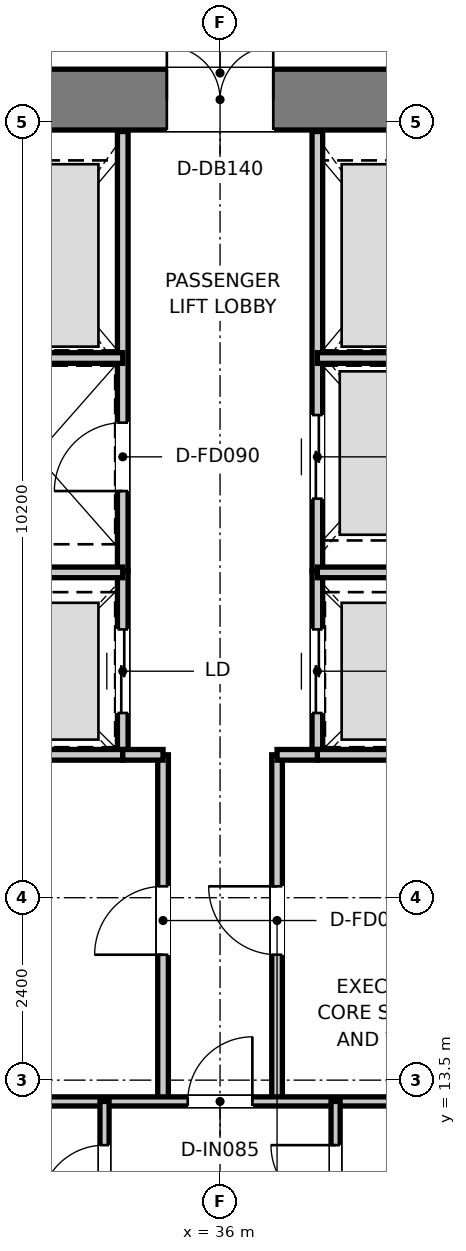
"""IFC4 building model, lengths in metres.
Left out: names, types, materials, properties, quantities, classifications, styles, units other than length and angle.
Written with IfcOpenShell. Run it as: python <this file> out.ifc"""

import sys

from ifc_helpers import new_model, si_unit, direction, frame, frame_2d, origin, place, context, subcontext, project, spatial, rectangle, extrude, element, fill, save


model = new_model("IFC4")
c1 = context("Model", 3, precision=1e-05, world=origin(), true_north=direction((0.0, 1.0)))
c2 = subcontext(c1, "Body", "Model", "MODEL_VIEW")
j1 = project(units=[si_unit("LENGTHUNIT", "METRE"), si_unit("PLANEANGLEUNIT", "RADIAN")], contexts=[c1])
p1 = place(None, origin())
s1 = spatial("IfcSite", under=j1, at=p1, CompositionType="ELEMENT")
p2 = place(p1, origin())
s2 = spatial("IfcBuilding", under=s1, at=p2, CompositionType="ELEMENT")
p3 = place(p2, frame((0.0, 0.0, 302.95)))
s3 = spatial("IfcBuildingStorey", under=s2, at=p3, CompositionType="ELEMENT", Elevation=302.95)
p4 = place(p3, frame((28.08, 26.4, 0.0), z_axis=(0.0, 0.0, 1.0), x_axis=(1.0, 0.0, 0.0)))
e1 = element("IfcWall", 1, at=p4, inside=s3, PredefinedType="SHEAR", context=c2, shape_type="SweptSolid", body=[
    extrude(rectangle(XDim=15.84, YDim=0.8, at=frame_2d((7.92, 0.0))), origin(), (0.0, 0.0, 1.0), 3.95),
])
p5 = place(p4, frame((7.22, 0.0, 0.0)))
e2 = element("IfcOpeningElement", 2, at=p5, cuts=e1, PredefinedType="OPENING", context=c2, shape_type="SweptSolid", body=[
    extrude(rectangle(XDim=1.4, YDim=2.2, at=frame_2d((0.7, 1.1))), frame((0.0, 0.41, 0.0), z_axis=(0.0, -1.0, 0.0), x_axis=(1.0, 0.0, 0.0)), (0.0, 0.0, 1.0), 0.82),
])
p6 = place(p4, frame((1.775, 0.0, 0.0)))
e3 = element("IfcOpeningElement", 3, at=p6, cuts=e1, PredefinedType="OPENING", context=c2, shape_type="SweptSolid", body=[
    extrude(rectangle(XDim=1.05, YDim=2.1, at=frame_2d((0.525, 1.05))), frame((0.0, 0.41, 0.0), z_axis=(0.0, -1.0, 0.0), x_axis=(1.0, 0.0, 0.0)), (0.0, 0.0, 1.0), 0.82),
])
p7 = place(p4, frame((13.015, 0.0, 0.0)))
e4 = element("IfcOpeningElement", 4, at=p7, cuts=e1, PredefinedType="OPENING", context=c2, shape_type="SweptSolid", body=[
    extrude(rectangle(XDim=1.05, YDim=2.1, at=frame_2d((0.525, 1.05))), frame((0.0, 0.41, 0.0), z_axis=(0.0, -1.0, 0.0), x_axis=(1.0, 0.0, 0.0)), (0.0, 0.0, 1.0), 0.82),
])
p8 = place(p3, frame((34.72, 20.2, 0.0), z_axis=(0.0, 0.0, 1.0), x_axis=(0.0, 1.0, 0.0)))
e5 = element("IfcWall", 5, at=p8, inside=s3, PredefinedType="PARTITIONING", context=c2, shape_type="SweptSolid", body=[
    extrude(rectangle(XDim=5.78, YDim=0.14, at=frame_2d((2.89, 0.0))), origin(), (0.0, 0.0, 1.0), 2.82),
])
p9 = place(p8, frame((1.05, 0.0, 0.0)))
e6 = element("IfcOpeningElement", 6, at=p9, cuts=e5, PredefinedType="OPENING", context=c2, shape_type="SweptSolid", body=[
    extrude(rectangle(XDim=0.9, YDim=2.1, at=frame_2d((0.45, 1.05))), frame((0.0, 0.08, 0.0), z_axis=(0.0, -1.0, 0.0), x_axis=(1.0, 0.0, 0.0)), (0.0, 0.0, 1.0), 0.16),
])
p10 = place(p3, frame((37.28, 20.2, 0.0), z_axis=(0.0, 0.0, 1.0), x_axis=(0.0, 1.0, 0.0)))
e7 = element("IfcWall", 7, at=p10, inside=s3, PredefinedType="PARTITIONING", context=c2, shape_type="SweptSolid", body=[
    extrude(rectangle(XDim=5.78, YDim=0.14, at=frame_2d((2.89, 0.0))), origin(), (0.0, 0.0, 1.0), 2.82),
])
p11 = place(p10, frame((0.95, 0.0, 0.0)))
e8 = element("IfcOpeningElement", 8, at=p11, cuts=e7, PredefinedType="OPENING", context=c2, shape_type="SweptSolid", body=[
    extrude(rectangle(XDim=1.1, YDim=2.15, at=frame_2d((0.55, 1.075))), frame((0.0, 0.08, 0.0), z_axis=(0.0, -1.0, 0.0), x_axis=(1.0, 0.0, 0.0)), (0.0, 0.0, 1.0), 0.16),
])
for number, where, z_axis, x_axis in (
    (9, (32.45, 23.0, 0.0), (0.0, 0.0, 1.0), (1.0, 0.0, 0.0)),
    (10, (37.28, 23.0, 0.0), (0.0, 0.0, 1.0), (1.0, 0.0, 0.0)),
):
    element("IfcWall", number, at=place(p3, frame(where, z_axis=z_axis, x_axis=x_axis)), inside=s3, PredefinedType="PARTITIONING", context=c2, shape_type="SweptSolid", body=[
        extrude(rectangle(XDim=2.27, YDim=0.14, at=frame_2d((1.135, 0.0))), origin(), (0.0, 0.0, 1.0), 2.82),
    ])
p12 = place(p3, frame((34.72, 17.78, 0.0), z_axis=(0.0, 0.0, 1.0), x_axis=(0.0, 1.0, 0.0)))
e11 = element("IfcWall", 11, at=p12, inside=s3, PredefinedType="PARTITIONING", context=c2, shape_type="SweptSolid", body=[
    extrude(rectangle(XDim=2.42, YDim=0.14, at=frame_2d((1.21, 0.0))), origin(), (0.0, 0.0, 1.0), 3.67),
])
p13 = place(p12, frame((0.55, 0.0, 0.0)))
e12 = element("IfcOpeningElement", 12, at=p13, cuts=e11, PredefinedType="OPENING", context=c2, shape_type="SweptSolid", body=[
    extrude(rectangle(XDim=1.1, YDim=2.15, at=frame_2d((0.55, 1.075))), frame((0.0, 0.08, 0.0), z_axis=(0.0, -1.0, 0.0), x_axis=(1.0, 0.0, 0.0)), (0.0, 0.0, 1.0), 0.16),
])
p14 = place(p3, frame((37.28, 17.78, 0.0), z_axis=(0.0, 0.0, 1.0), x_axis=(0.0, 1.0, 0.0)))
e13 = element("IfcWall", 13, at=p14, inside=s3, PredefinedType="PARTITIONING", context=c2, shape_type="SweptSolid", body=[
    extrude(rectangle(XDim=2.42, YDim=0.14, at=frame_2d((1.21, 0.0))), origin(), (0.0, 0.0, 1.0), 3.67),
])
p15 = place(p14, frame((0.55, 0.0, 0.0)))
e14 = element("IfcOpeningElement", 14, at=p15, cuts=e13, PredefinedType="OPENING", context=c2, shape_type="SweptSolid", body=[
    extrude(rectangle(XDim=1.1, YDim=2.15, at=frame_2d((0.55, 1.075))), frame((0.0, 0.08, 0.0), z_axis=(0.0, -1.0, 0.0), x_axis=(1.0, 0.0, 0.0)), (0.0, 0.0, 1.0), 0.16),
])
for number, where, z_axis, x_axis in (
    (15, (32.45, 17.78, 0.0), (0.0, 0.0, 1.0), (1.0, 0.0, 0.0)),
    (16, (32.45, 20.18, 0.0), (0.0, 0.0, 1.0), (1.0, 0.0, 0.0)),
    (17, (37.28, 17.78, 0.0), (0.0, 0.0, 1.0), (1.0, 0.0, 0.0)),
    (18, (37.28, 20.18, 0.0), (0.0, 0.0, 1.0), (1.0, 0.0, 0.0)),
):
    element("IfcWall", number, at=place(p3, frame(where, z_axis=z_axis, x_axis=x_axis)), inside=s3, PredefinedType="PARTITIONING", context=c2, shape_type="SweptSolid", body=[
        extrude(rectangle(XDim=2.27, YDim=0.14, at=frame_2d((1.135, 0.0))), origin(), (0.0, 0.0, 1.0), 3.67),
    ])
p16 = place(p3, frame((35.25, 13.22, 0.0), z_axis=(0.0, 0.0, 1.0), x_axis=(0.0, 1.0, 0.0)))
e19 = element("IfcWall", 19, at=p16, inside=s3, PredefinedType="PARTITIONING", context=c2, shape_type="SweptSolid", body=[
    extrude(rectangle(XDim=4.56, YDim=0.14, at=frame_2d((2.28, 0.0))), origin(), (0.0, 0.0, 1.0), 3.67),
])
p17 = place(p16, frame((1.93, 0.0, 0.0)))
e20 = element("IfcOpeningElement", 20, at=p17, cuts=e19, PredefinedType="OPENING", context=c2, shape_type="SweptSolid", body=[
    extrude(rectangle(XDim=0.9, YDim=2.1, at=frame_2d((0.45, 1.05))), frame((0.0, 0.08, 0.0), z_axis=(0.0, -1.0, 0.0), x_axis=(1.0, 0.0, 0.0)), (0.0, 0.0, 1.0), 0.16),
])
p18 = place(p3, frame((34.72, 17.78, 0.0), z_axis=(0.0, 0.0, 1.0), x_axis=(1.0, 0.0, 0.0)))
e21 = element("IfcWall", 21, at=p18, inside=s3, PredefinedType="PARTITIONING", context=c2, shape_type="SweptSolid", body=[
    extrude(rectangle(XDim=0.53, YDim=0.14, at=frame_2d((0.265, 0.0))), origin(), (0.0, 0.0, 1.0), 3.67),
])
p19 = place(p3, frame((36.75, 13.22, 0.0), z_axis=(0.0, 0.0, 1.0), x_axis=(0.0, 1.0, 0.0)))
e22 = element("IfcWall", 22, at=p19, inside=s3, PredefinedType="PARTITIONING", context=c2, shape_type="SweptSolid", body=[
    extrude(rectangle(XDim=4.56, YDim=0.14, at=frame_2d((2.28, 0.0))), origin(), (0.0, 0.0, 1.0), 3.67),
])
p20 = place(p19, frame((1.93, 0.0, 0.0)))
e23 = element("IfcOpeningElement", 23, at=p20, cuts=e22, PredefinedType="OPENING", context=c2, shape_type="SweptSolid", body=[
    extrude(rectangle(XDim=0.9, YDim=2.1, at=frame_2d((0.45, 1.05))), frame((0.0, 0.08, 0.0), z_axis=(0.0, -1.0, 0.0), x_axis=(1.0, 0.0, 0.0)), (0.0, 0.0, 1.0), 0.16),
])
p21 = place(p3, frame((36.75, 17.78, 0.0), z_axis=(0.0, 0.0, 1.0), x_axis=(1.0, 0.0, 0.0)))
e24 = element("IfcWall", 24, at=p21, inside=s3, PredefinedType="PARTITIONING", context=c2, shape_type="SweptSolid", body=[
    extrude(rectangle(XDim=0.53, YDim=0.14, at=frame_2d((0.265, 0.0))), origin(), (0.0, 0.0, 1.0), 3.67),
])
p22 = place(p3, frame((32.21, 13.22, 0.0), z_axis=(0.0, 0.0, 1.0), x_axis=(1.0, 0.0, 0.0)))
e25 = element("IfcWall", 25, at=p22, inside=s3, PredefinedType="PARTITIONING", context=c2, shape_type="SweptSolid", body=[
    extrude(rectangle(XDim=7.58, YDim=0.12, at=frame_2d((3.79, 0.0))), origin(), (0.0, 0.0, 1.0), 3.67),
])
p23 = place(p22, frame((3.365, 0.0, 0.0)))
e26 = element("IfcOpeningElement", 26, at=p23, cuts=e25, PredefinedType="OPENING", context=c2, shape_type="SweptSolid", body=[
    extrude(rectangle(XDim=0.85, YDim=2.1, at=frame_2d((0.425, 1.05))), frame((0.0, 0.07, 0.0), z_axis=(0.0, -1.0, 0.0), x_axis=(1.0, 0.0, 0.0)), (0.0, 0.0, 1.0), 0.14),
])
p24 = place(p3, frame((34.48, 11.25, 0.0), z_axis=(0.0, 0.0, 1.0), x_axis=(0.0, 1.0, 0.0)))
e27 = element("IfcWall", 27, at=p24, inside=s3, PredefinedType="PARTITIONING", context=c2, shape_type="SweptSolid", body=[
    extrude(rectangle(XDim=1.97, YDim=0.12, at=frame_2d((0.985, 0.0))), origin(), (0.0, 0.0, 1.0), 3.67),
])
p25 = place(p24, frame((0.545, 0.0, 0.0)))
e28 = element("IfcOpeningElement", 28, at=p25, cuts=e27, PredefinedType="OPENING", context=c2, shape_type="SweptSolid", body=[
    extrude(rectangle(XDim=0.85, YDim=2.1, at=frame_2d((0.425, 1.05))), frame((0.0, 0.07, 0.0), z_axis=(0.0, -1.0, 0.0), x_axis=(1.0, 0.0, 0.0)), (0.0, 0.0, 1.0), 0.14),
])
p26 = place(p3, frame((37.52, 11.25, 0.0), z_axis=(0.0, 0.0, 1.0), x_axis=(0.0, 1.0, 0.0)))
e29 = element("IfcWall", 29, at=p26, inside=s3, PredefinedType="PARTITIONING", context=c2, shape_type="SweptSolid", body=[
    extrude(rectangle(XDim=1.97, YDim=0.12, at=frame_2d((0.985, 0.0))), origin(), (0.0, 0.0, 1.0), 3.67),
])
p27 = place(p26, frame((0.545, 0.0, 0.0)))
e30 = element("IfcOpeningElement", 30, at=p27, cuts=e29, PredefinedType="OPENING", context=c2, shape_type="SweptSolid", body=[
    extrude(rectangle(XDim=0.85, YDim=2.1, at=frame_2d((0.425, 1.05))), frame((0.0, 0.07, 0.0), z_axis=(0.0, -1.0, 0.0), x_axis=(1.0, 0.0, 0.0)), (0.0, 0.0, 1.0), 0.14),
])
p28 = place(p5, origin())
e31 = element("IfcDoor", 31, at=p28, inside=s3, OperationType="DOUBLE_DOOR_SINGLE_SWING", PredefinedType="DOOR", context=c2, shape_type="SweptSolid", body=[
    extrude(rectangle(XDim=1.4, YDim=2.2, at=frame_2d((0.7, 1.1))), frame((0.0, 0.025, 0.0), z_axis=(0.0, -1.0, 0.0), x_axis=(1.0, 0.0, 0.0)), (0.0, 0.0, 1.0), 0.05),
])
fill(e2, e31)
p29 = place(p9, origin())
e32 = element("IfcDoor", 32, at=p29, inside=s3, OperationType="SINGLE_SWING_LEFT", PredefinedType="DOOR", context=c2, shape_type="SweptSolid", body=[
    extrude(rectangle(XDim=0.9, YDim=2.1, at=frame_2d((0.45, 1.05))), frame((0.0, 0.025, 0.0), z_axis=(0.0, -1.0, 0.0), x_axis=(1.0, 0.0, 0.0)), (0.0, 0.0, 1.0), 0.05),
])
fill(e6, e32)
p30 = place(p11, origin())
e33 = element("IfcDoor", 33, at=p30, inside=s3, OperationType="DOUBLE_DOOR_SLIDING", PredefinedType="DOOR", context=c2, shape_type="SweptSolid", body=[
    extrude(rectangle(XDim=1.1, YDim=2.15, at=frame_2d((0.55, 1.075))), frame((0.0, 0.025, 0.0), z_axis=(0.0, -1.0, 0.0), x_axis=(1.0, 0.0, 0.0)), (0.0, 0.0, 1.0), 0.05),
])
fill(e8, e33)
p31 = place(p13, origin())
e34 = element("IfcDoor", 34, at=p31, inside=s3, OperationType="DOUBLE_DOOR_SLIDING", PredefinedType="DOOR", context=c2, shape_type="SweptSolid", body=[
    extrude(rectangle(XDim=1.1, YDim=2.15, at=frame_2d((0.55, 1.075))), frame((0.0, 0.025, 0.0), z_axis=(0.0, -1.0, 0.0), x_axis=(1.0, 0.0, 0.0)), (0.0, 0.0, 1.0), 0.05),
])
fill(e12, e34)
p32 = place(p15, origin())
e35 = element("IfcDoor", 35, at=p32, inside=s3, OperationType="DOUBLE_DOOR_SLIDING", PredefinedType="DOOR", context=c2, shape_type="SweptSolid", body=[
    extrude(rectangle(XDim=1.1, YDim=2.15, at=frame_2d((0.55, 1.075))), frame((0.0, 0.025, 0.0), z_axis=(0.0, -1.0, 0.0), x_axis=(1.0, 0.0, 0.0)), (0.0, 0.0, 1.0), 0.05),
])
fill(e14, e35)
p33 = place(p17, origin())
e36 = element("IfcDoor", 36, at=p33, inside=s3, OperationType="SINGLE_SWING_LEFT", PredefinedType="DOOR", context=c2, shape_type="SweptSolid", body=[
    extrude(rectangle(XDim=0.9, YDim=2.1, at=frame_2d((0.45, 1.05))), frame((0.0, 0.025, 0.0), z_axis=(0.0, -1.0, 0.0), x_axis=(1.0, 0.0, 0.0)), (0.0, 0.0, 1.0), 0.05),
])
fill(e20, e36)
p34 = place(p20, origin())
e37 = element("IfcDoor", 37, at=p34, inside=s3, OperationType="SINGLE_SWING_RIGHT", PredefinedType="DOOR", context=c2, shape_type="SweptSolid", body=[
    extrude(rectangle(XDim=0.9, YDim=2.1, at=frame_2d((0.45, 1.05))), frame((0.0, 0.025, 0.0), z_axis=(0.0, -1.0, 0.0), x_axis=(1.0, 0.0, 0.0)), (0.0, 0.0, 1.0), 0.05),
])
fill(e23, e37)
p35 = place(p23, origin())
e38 = element("IfcDoor", 38, at=p35, inside=s3, OperationType="SINGLE_SWING_RIGHT", PredefinedType="DOOR", context=c2, shape_type="SweptSolid", body=[
    extrude(rectangle(XDim=0.85, YDim=2.1, at=frame_2d((0.425, 1.05))), frame((0.0, 0.025, 0.0), z_axis=(0.0, -1.0, 0.0), x_axis=(1.0, 0.0, 0.0)), (0.0, 0.0, 1.0), 0.05),
])
fill(e26, e38)
p36 = place(p25, origin())
e39 = element("IfcDoor", 39, at=p36, inside=s3, OperationType="SINGLE_SWING_LEFT", PredefinedType="DOOR", context=c2, shape_type="SweptSolid", body=[
    extrude(rectangle(XDim=0.85, YDim=2.1, at=frame_2d((0.425, 1.05))), frame((0.0, 0.025, 0.0), z_axis=(0.0, -1.0, 0.0), x_axis=(1.0, 0.0, 0.0)), (0.0, 0.0, 1.0), 0.05),
])
fill(e28, e39)
p37 = place(p27, origin())
e40 = element("IfcDoor", 40, at=p37, inside=s3, OperationType="SINGLE_SWING_RIGHT", PredefinedType="DOOR", context=c2, shape_type="SweptSolid", body=[
    extrude(rectangle(XDim=0.85, YDim=2.1, at=frame_2d((0.425, 1.05))), frame((0.0, 0.025, 0.0), z_axis=(0.0, -1.0, 0.0), x_axis=(1.0, 0.0, 0.0)), (0.0, 0.0, 1.0), 0.05),
])
fill(e30, e40)
save(model, sys.argv[1])
